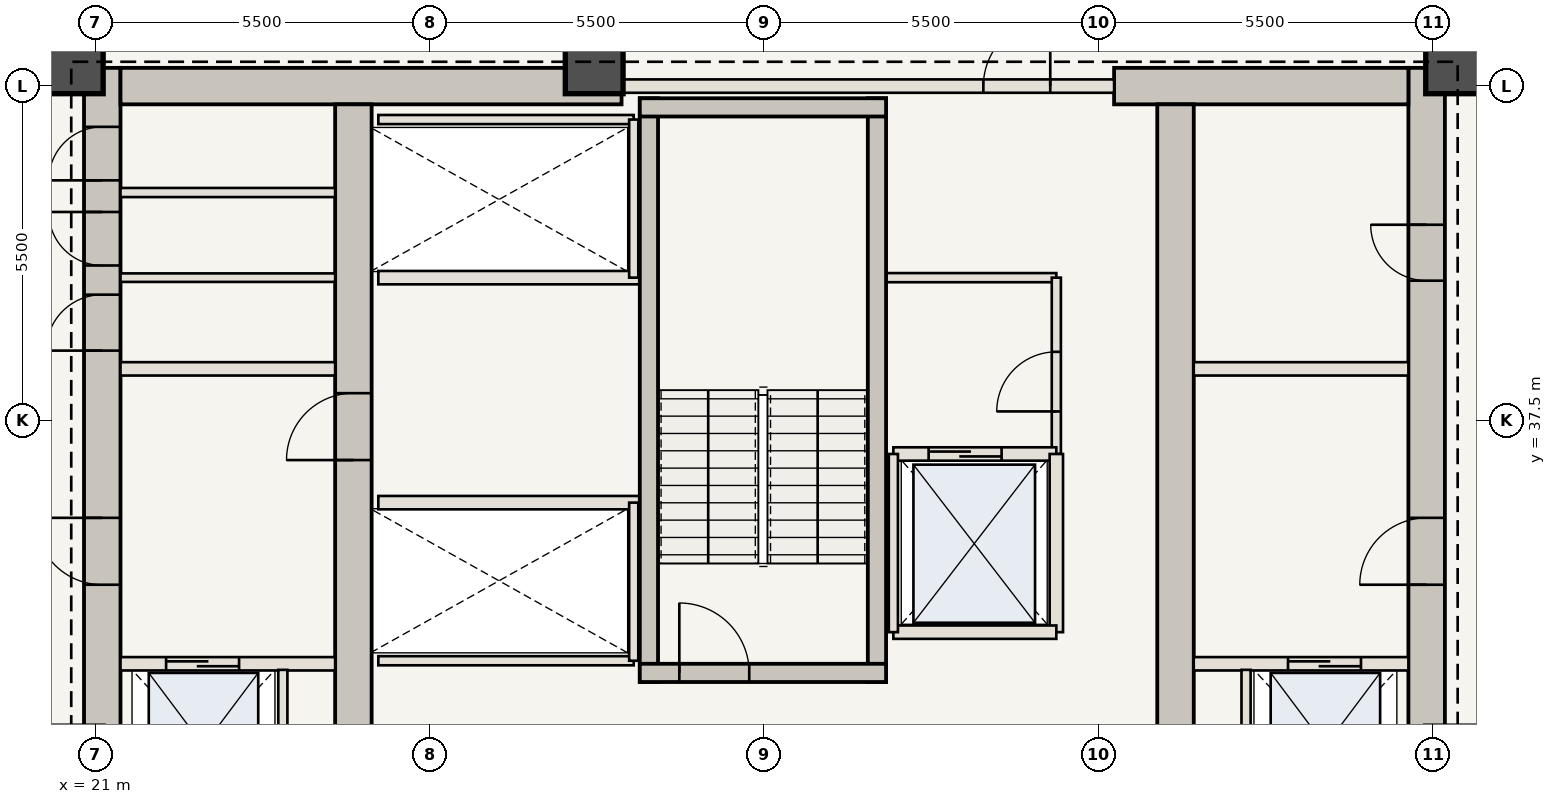
"""IFC4 building model, lengths in metres.
Left out: names, types, materials, properties, quantities, classifications, styles, units other than length and angle.
Written with IfcOpenShell. Run it as: python <this file> out.ifc"""

import sys

from ifc_helpers import new_model, si_unit, direction, frame, frame_2d, origin, origin_2d, place, context, subcontext, project, spatial, rectangle, extrude, element, fill, save


model = new_model("IFC4")
c1 = context("Model", 3, precision=1e-05, world=origin(), true_north=direction((0.0, 1.0)))
c2 = subcontext(c1, "Body", "Model", "MODEL_VIEW")
j1 = project(units=[si_unit("LENGTHUNIT", "METRE"), si_unit("PLANEANGLEUNIT", "RADIAN")], contexts=[c1])
p1 = place(None, origin())
s1 = spatial("IfcSite", under=j1, at=p1, CompositionType="ELEMENT")
p2 = place(p1, origin())
s2 = spatial("IfcBuilding", under=s1, at=p2, CompositionType="ELEMENT")
p3 = place(p2, frame((0.0, 0.0, 168.35)))
s3 = spatial("IfcBuildingStorey", under=s2, at=p3, CompositionType="ELEMENT", Elevation=168.35)
p4 = place(p3, frame((21.11, 30.6, 0.0), z_axis=(0.0, 0.0, 1.0), x_axis=(0.0, 1.0, 0.0)))
e1 = element("IfcWall", 1, at=p4, inside=s3, PredefinedType="SHEAR", context=c2, shape_type="SweptSolid", body=[
    extrude(rectangle(XDim=12.7, YDim=0.6, at=frame_2d((6.35, 0.0))), origin(), (0.0, 0.0, 1.0), 3.85),
])
p5 = place(p4, frame((4.2, 0.0, 0.0)))
e2 = element("IfcOpeningElement", 2, at=p5, cuts=e1, PredefinedType="OPENING", context=c2, shape_type="SweptSolid", body=[
    extrude(rectangle(XDim=1.1, YDim=2.15, at=frame_2d((0.55, 1.075))), frame((0.0, 0.31, 0.0), z_axis=(0.0, -1.0, 0.0), x_axis=(1.0, 0.0, 0.0)), (0.0, 0.0, 1.0), 0.62),
])
p6 = place(p4, frame((8.05, 0.0, 0.0)))
e3 = element("IfcOpeningElement", 3, at=p6, cuts=e1, PredefinedType="OPENING", context=c2, shape_type="SweptSolid", body=[
    extrude(rectangle(XDim=0.92, YDim=2.1, at=frame_2d((0.46, 1.05))), frame((0.0, 0.31, 0.0), z_axis=(0.0, -1.0, 0.0), x_axis=(1.0, 0.0, 0.0)), (0.0, 0.0, 1.0), 0.62),
])
p7 = place(p4, frame((9.45, 0.0, 0.0)))
e4 = element("IfcOpeningElement", 4, at=p7, cuts=e1, PredefinedType="OPENING", context=c2, shape_type="SweptSolid", body=[
    extrude(rectangle(XDim=0.88, YDim=2.1, at=frame_2d((0.44, 1.05))), frame((0.0, 0.31, 0.0), z_axis=(0.0, -1.0, 0.0), x_axis=(1.0, 0.0, 0.0)), (0.0, 0.0, 1.0), 0.62),
])
p8 = place(p4, frame((10.85, 0.0, 0.0)))
e5 = element("IfcOpeningElement", 5, at=p8, cuts=e1, PredefinedType="OPENING", context=c2, shape_type="SweptSolid", body=[
    extrude(rectangle(XDim=0.88, YDim=2.1, at=frame_2d((0.44, 1.05))), frame((0.0, 0.31, 0.0), z_axis=(0.0, -1.0, 0.0), x_axis=(1.0, 0.0, 0.0)), (0.0, 0.0, 1.0), 0.62),
])
p9 = place(p3, frame((42.89, 30.6, 0.0), z_axis=(0.0, 0.0, 1.0), x_axis=(0.0, 1.0, 0.0)))
e6 = element("IfcWall", 6, at=p9, inside=s3, PredefinedType="SHEAR", context=c2, shape_type="SweptSolid", body=[
    extrude(rectangle(XDim=12.7, YDim=0.6, at=frame_2d((6.35, 0.0))), origin(), (0.0, 0.0, 1.0), 3.85),
])
p10 = place(p9, frame((4.2, 0.0, 0.0)))
e7 = element("IfcOpeningElement", 7, at=p10, cuts=e6, PredefinedType="OPENING", context=c2, shape_type="SweptSolid", body=[
    extrude(rectangle(XDim=1.1, YDim=2.15, at=frame_2d((0.55, 1.075))), frame((0.0, 0.31, 0.0), z_axis=(0.0, -1.0, 0.0), x_axis=(1.0, 0.0, 0.0)), (0.0, 0.0, 1.0), 0.62),
])
p11 = place(p9, frame((9.2, 0.0, 0.0)))
e8 = element("IfcOpeningElement", 8, at=p11, cuts=e6, PredefinedType="OPENING", context=c2, shape_type="SweptSolid", body=[
    extrude(rectangle(XDim=0.92, YDim=2.1, at=frame_2d((0.46, 1.05))), frame((0.0, 0.31, 0.0), z_axis=(0.0, -1.0, 0.0), x_axis=(1.0, 0.0, 0.0)), (0.0, 0.0, 1.0), 0.62),
])
p12 = place(p3, frame((21.41, 43.0, 0.0), z_axis=(0.0, 0.0, 1.0), x_axis=(1.0, 0.0, 0.0)))
e9 = element("IfcWall", 9, at=p12, inside=s3, PredefinedType="SHEAR", context=c2, shape_type="SweptSolid", body=[
    extrude(rectangle(XDim=8.24, YDim=0.6, at=frame_2d((4.12, 0.0))), origin(), (0.0, 0.0, 1.0), 3.85),
])
p13 = place(p3, frame((37.75, 43.0, 0.0), z_axis=(0.0, 0.0, 1.0), x_axis=(1.0, 0.0, 0.0)))
e10 = element("IfcWall", 10, at=p13, inside=s3, PredefinedType="SHEAR", context=c2, shape_type="SweptSolid", body=[
    extrude(rectangle(XDim=4.84, YDim=0.6, at=frame_2d((2.42, 0.0))), origin(), (0.0, 0.0, 1.0), 3.85),
])
p14 = place(p3, frame((25.24, 30.6, 0.0), z_axis=(0.0, 0.0, 1.0), x_axis=(0.0, 1.0, 0.0)))
e11 = element("IfcWall", 11, at=p14, inside=s3, PredefinedType="SHEAR", context=c2, shape_type="SweptSolid", body=[
    extrude(rectangle(XDim=12.1, YDim=0.6, at=frame_2d((6.05, 0.0))), origin(), (0.0, 0.0, 1.0), 3.85),
])
p15 = place(p14, frame((6.25, 0.0, 0.0)))
e12 = element("IfcOpeningElement", 12, at=p15, cuts=e11, PredefinedType="OPENING", context=c2, shape_type="SweptSolid", body=[
    extrude(rectangle(XDim=1.1, YDim=2.15, at=frame_2d((0.55, 1.075))), frame((0.0, 0.31, 0.0), z_axis=(0.0, -1.0, 0.0), x_axis=(1.0, 0.0, 0.0)), (0.0, 0.0, 1.0), 0.62),
])
p16 = place(p3, frame((38.76, 30.6, 0.0), z_axis=(0.0, 0.0, 1.0), x_axis=(0.0, 1.0, 0.0)))
e13 = element("IfcWall", 13, at=p16, inside=s3, PredefinedType="SHEAR", context=c2, shape_type="SweptSolid", body=[
    extrude(rectangle(XDim=12.1, YDim=0.6, at=frame_2d((6.05, 0.0))), origin(), (0.0, 0.0, 1.0), 3.85),
])
for number, where, z_axis, x_axis in (
    (14, (43.35, 43.35, 0.0), (0.0, 0.0, 1.0), (1.0, 0.0, 0.0)),
    (15, (29.2, 43.35, 0.0), (0.0, 0.0, 1.0), (1.0, 0.0, 0.0)),
    (16, (20.65, 43.35, 0.0), (0.0, 0.0, 1.0), (1.0, 0.0, 0.0)),
):
    element("IfcColumn", number, at=place(p3, frame(where, z_axis=z_axis, x_axis=x_axis)), inside=s3, PredefinedType="COLUMN", context=c2, shape_type="SweptSolid", body=[
        extrude(rectangle(XDim=0.95, YDim=0.95, at=origin_2d()), origin(), (0.0, 0.0, 1.0), 3.85),
    ])
p17 = place(p3, frame((21.41, 33.5, 0.0), z_axis=(0.0, 0.0, 1.0), x_axis=(1.0, 0.0, 0.0)))
e17 = element("IfcWall", 17, at=p17, inside=s3, PredefinedType="STANDARD", context=c2, shape_type="SweptSolid", body=[
    extrude(rectangle(XDim=3.53, YDim=0.22, at=frame_2d((1.765, 0.0))), origin(), (0.0, 0.0, 1.0), 3.685),
])
p18 = place(p17, frame((0.75, 0.0, 0.0)))
e18 = element("IfcOpeningElement", 18, at=p18, cuts=e17, PredefinedType="OPENING", context=c2, shape_type="SweptSolid", body=[
    extrude(rectangle(XDim=1.2, YDim=2.2, at=frame_2d((0.6, 1.1))), frame((0.0, 0.12, 0.0), z_axis=(0.0, -1.0, 0.0), x_axis=(1.0, 0.0, 0.0)), (0.0, 0.0, 1.0), 0.24),
])
p19 = place(p3, frame((24.08, 30.75, 0.0), z_axis=(0.0, 0.0, 1.0), x_axis=(0.0, 1.0, 0.0)))
e19 = element("IfcWall", 19, at=p19, inside=s3, PredefinedType="STANDARD", context=c2, shape_type="SweptSolid", body=[
    extrude(rectangle(XDim=2.65, YDim=0.15, at=frame_2d((1.325, 0.0))), origin(), (0.0, 0.0, 1.0), 3.685),
])
p20 = place(p3, frame((39.06, 33.5, 0.0), z_axis=(0.0, 0.0, 1.0), x_axis=(1.0, 0.0, 0.0)))
e20 = element("IfcWall", 20, at=p20, inside=s3, PredefinedType="STANDARD", context=c2, shape_type="SweptSolid", body=[
    extrude(rectangle(XDim=3.53, YDim=0.22, at=frame_2d((1.765, 0.0))), origin(), (0.0, 0.0, 1.0), 3.685),
])
p21 = place(p20, frame((1.55, 0.0, 0.0)))
e21 = element("IfcOpeningElement", 21, at=p21, cuts=e20, PredefinedType="OPENING", context=c2, shape_type="SweptSolid", body=[
    extrude(rectangle(XDim=1.2, YDim=2.2, at=frame_2d((0.6, 1.1))), frame((0.0, 0.12, 0.0), z_axis=(0.0, -1.0, 0.0), x_axis=(1.0, 0.0, 0.0)), (0.0, 0.0, 1.0), 0.24),
])
p22 = place(p3, frame((39.92, 30.75, 0.0), z_axis=(0.0, 0.0, 1.0), x_axis=(0.0, 1.0, 0.0)))
e22 = element("IfcWall", 22, at=p22, inside=s3, PredefinedType="STANDARD", context=c2, shape_type="SweptSolid", body=[
    extrude(rectangle(XDim=2.65, YDim=0.15, at=frame_2d((1.325, 0.0))), origin(), (0.0, 0.0, 1.0), 3.685),
])
for number, where, z_axis, x_axis in (
    (23, (21.41, 38.35, 0.0), (0.0, 0.0, 1.0), (1.0, 0.0, 0.0)),
    (24, (39.06, 38.35, 0.0), (0.0, 0.0, 1.0), (1.0, 0.0, 0.0)),
):
    element("IfcWall", number, at=place(p3, frame(where, z_axis=z_axis, x_axis=x_axis)), inside=s3, PredefinedType="STANDARD", context=c2, shape_type="SweptSolid", body=[
        extrude(rectangle(XDim=3.53, YDim=0.22, at=frame_2d((1.765, 0.0))), origin(), (0.0, 0.0, 1.0), 3.685),
    ])
p23 = place(p3, frame((21.41, 39.85, 0.0), z_axis=(0.0, 0.0, 1.0), x_axis=(1.0, 0.0, 0.0)))
e25 = element("IfcWall", 25, at=p23, inside=s3, PredefinedType="STANDARD", context=c2, shape_type="SweptSolid", body=[
    extrude(rectangle(XDim=3.53, YDim=0.14, at=frame_2d((1.765, 0.0))), origin(), (0.0, 0.0, 1.0), 3.685),
])
p24 = place(p3, frame((21.41, 41.25, 0.0), z_axis=(0.0, 0.0, 1.0), x_axis=(1.0, 0.0, 0.0)))
e26 = element("IfcWall", 26, at=p24, inside=s3, PredefinedType="STANDARD", context=c2, shape_type="SweptSolid", body=[
    extrude(rectangle(XDim=3.53, YDim=0.15, at=frame_2d((1.765, 0.0))), origin(), (0.0, 0.0, 1.0), 3.685),
])
p25 = place(p3, frame((34.0, 39.85, 0.0), z_axis=(0.0, 0.0, 1.0), x_axis=(1.0, 0.0, 0.0)))
e27 = element("IfcWall", 27, at=p25, inside=s3, PredefinedType="STANDARD", context=c2, shape_type="SweptSolid", body=[
    extrude(rectangle(XDim=2.8, YDim=0.15, at=frame_2d((1.4, 0.0))), origin(), (0.0, 0.0, 1.0), 3.685),
])
p26 = place(p3, frame((36.8, 36.95, 0.0), z_axis=(0.0, 0.0, 1.0), x_axis=(0.0, 1.0, 0.0)))
e28 = element("IfcWall", 28, at=p26, inside=s3, PredefinedType="STANDARD", context=c2, shape_type="SweptSolid", body=[
    extrude(rectangle(XDim=2.9, YDim=0.15, at=frame_2d((1.45, 0.0))), origin(), (0.0, 0.0, 1.0), 3.685),
])
p27 = place(p26, frame((0.7, 0.0, 0.0)))
e29 = element("IfcOpeningElement", 29, at=p27, cuts=e28, PredefinedType="OPENING", context=c2, shape_type="SweptSolid", body=[
    extrude(rectangle(XDim=0.98, YDim=2.2, at=frame_2d((0.49, 1.1))), frame((0.0, 0.085, 0.0), z_axis=(0.0, -1.0, 0.0), x_axis=(1.0, 0.0, 0.0)), (0.0, 0.0, 1.0), 0.17),
])
p28 = place(p3, frame((25.65, 36.15, 0.0), z_axis=(0.0, 0.0, 1.0), x_axis=(1.0, 0.0, 0.0)))
e30 = element("IfcWall", 30, at=p28, inside=s3, PredefinedType="STANDARD", context=c2, shape_type="SweptSolid", body=[
    extrude(rectangle(XDim=4.3, YDim=0.22, at=frame_2d((2.15, 0.0))), origin(), (0.0, 0.0, 1.0), 3.685),
])
p29 = place(p3, frame((25.65, 33.55, 0.0), z_axis=(0.0, 0.0, 1.0), x_axis=(1.0, 0.0, 0.0)))
e31 = element("IfcWall", 31, at=p29, inside=s3, PredefinedType="STANDARD", context=c2, shape_type="SweptSolid", body=[
    extrude(rectangle(XDim=4.2, YDim=0.15, at=frame_2d((2.1, 0.0))), origin(), (0.0, 0.0, 1.0), 3.685),
])
p30 = place(p3, frame((29.85, 33.55, 0.0), z_axis=(0.0, 0.0, 1.0), x_axis=(0.0, 1.0, 0.0)))
e32 = element("IfcWall", 32, at=p30, inside=s3, PredefinedType="STANDARD", context=c2, shape_type="SweptSolid", body=[
    extrude(rectangle(XDim=2.6, YDim=0.15, at=frame_2d((1.3, 0.0))), origin(), (0.0, 0.0, 1.0), 3.685),
])
p31 = place(p3, frame((25.65, 39.85, 0.0), z_axis=(0.0, 0.0, 1.0), x_axis=(1.0, 0.0, 0.0)))
e33 = element("IfcWall", 33, at=p31, inside=s3, PredefinedType="STANDARD", context=c2, shape_type="SweptSolid", body=[
    extrude(rectangle(XDim=4.3, YDim=0.22, at=frame_2d((2.15, 0.0))), origin(), (0.0, 0.0, 1.0), 3.685),
])
p32 = place(p3, frame((25.65, 42.45, 0.0), z_axis=(0.0, 0.0, 1.0), x_axis=(1.0, 0.0, 0.0)))
e34 = element("IfcWall", 34, at=p32, inside=s3, PredefinedType="STANDARD", context=c2, shape_type="SweptSolid", body=[
    extrude(rectangle(XDim=4.2, YDim=0.15, at=frame_2d((2.1, 0.0))), origin(), (0.0, 0.0, 1.0), 3.685),
])
p33 = place(p3, frame((29.85, 39.85, 0.0), z_axis=(0.0, 0.0, 1.0), x_axis=(0.0, 1.0, 0.0)))
e35 = element("IfcWall", 35, at=p33, inside=s3, PredefinedType="STANDARD", context=c2, shape_type="SweptSolid", body=[
    extrude(rectangle(XDim=2.6, YDim=0.15, at=frame_2d((1.3, 0.0))), origin(), (0.0, 0.0, 1.0), 3.685),
])
for number, where, z_axis, x_axis in (
    (36, (30.1, 33.2, 0.0), (0.0, 0.0, 1.0), (0.0, 1.0, 0.0)),
    (37, (33.85, 33.2, 0.0), (0.0, 0.0, 1.0), (0.0, 1.0, 0.0)),
):
    element("IfcWall", number, at=place(p3, frame(where, z_axis=z_axis, x_axis=x_axis)), inside=s3, PredefinedType="SHEAR", context=c2, shape_type="SweptSolid", body=[
        extrude(rectangle(XDim=9.6, YDim=0.3, at=frame_2d((4.8, 0.0))), origin(), (0.0, 0.0, 1.0), 3.685),
    ])
p34 = place(p3, frame((29.95, 33.35, 0.0), z_axis=(0.0, 0.0, 1.0), x_axis=(1.0, 0.0, 0.0)))
e38 = element("IfcWall", 38, at=p34, inside=s3, PredefinedType="SHEAR", context=c2, shape_type="SweptSolid", body=[
    extrude(rectangle(XDim=4.05, YDim=0.3, at=frame_2d((2.025, 0.0))), origin(), (0.0, 0.0, 1.0), 3.685),
])
p35 = place(p34, frame((0.65, 0.0, 0.0)))
e39 = element("IfcOpeningElement", 39, at=p35, cuts=e38, PredefinedType="OPENING", context=c2, shape_type="SweptSolid", body=[
    extrude(rectangle(XDim=1.15, YDim=2.15, at=frame_2d((0.575, 1.075))), frame((0.0, 0.16, 0.0), z_axis=(0.0, -1.0, 0.0), x_axis=(1.0, 0.0, 0.0)), (0.0, 0.0, 1.0), 0.32),
])
p36 = place(p3, frame((29.95, 42.65, 0.0), z_axis=(0.0, 0.0, 1.0), x_axis=(1.0, 0.0, 0.0)))
e40 = element("IfcWall", 40, at=p36, inside=s3, PredefinedType="SHEAR", context=c2, shape_type="SweptSolid", body=[
    extrude(rectangle(XDim=4.05, YDim=0.3, at=frame_2d((2.025, 0.0))), origin(), (0.0, 0.0, 1.0), 3.685),
])
p37 = place(p3, frame((29.65, 43.0, 0.0), z_axis=(0.0, 0.0, 1.0), x_axis=(1.0, 0.0, 0.0)))
e41 = element("IfcWall", 41, at=p37, inside=s3, PredefinedType="STANDARD", context=c2, shape_type="SweptSolid", body=[
    extrude(rectangle(XDim=8.1, YDim=0.22, at=frame_2d((4.05, 0.0))), origin(), (0.0, 0.0, 1.0), 3.685),
])
p38 = place(p37, frame((5.95, 0.0, 0.0)))
e42 = element("IfcOpeningElement", 42, at=p38, cuts=e41, PredefinedType="OPENING", context=c2, shape_type="SweptSolid", body=[
    extrude(rectangle(XDim=1.1, YDim=2.15, at=frame_2d((0.55, 1.075))), frame((0.0, 0.12, 0.0), z_axis=(0.0, -1.0, 0.0), x_axis=(1.0, 0.0, 0.0)), (0.0, 0.0, 1.0), 0.24),
])
p39 = place(p3, frame((34.12, 36.95, 0.0), z_axis=(0.0, 0.0, 1.0), x_axis=(1.0, 0.0, 0.0)))
e43 = element("IfcWall", 43, at=p39, inside=s3, PredefinedType="STANDARD", context=c2, shape_type="SweptSolid", body=[
    extrude(rectangle(XDim=2.68, YDim=0.22, at=frame_2d((1.34, 0.0))), origin(), (0.0, 0.0, 1.0), 3.685),
])
p40 = place(p39, frame((0.58, 0.0, 0.0)))
e44 = element("IfcOpeningElement", 44, at=p40, cuts=e43, PredefinedType="OPENING", context=c2, shape_type="SweptSolid", body=[
    extrude(rectangle(XDim=1.2, YDim=2.2, at=frame_2d((0.6, 1.1))), frame((0.0, 0.12, 0.0), z_axis=(0.0, -1.0, 0.0), x_axis=(1.0, 0.0, 0.0)), (0.0, 0.0, 1.0), 0.24),
])
p41 = place(p3, frame((36.8, 34.02, 0.0), z_axis=(0.0, 0.0, 1.0), x_axis=(0.0, 1.0, 0.0)))
e45 = element("IfcWall", 45, at=p41, inside=s3, PredefinedType="STANDARD", context=c2, shape_type="SweptSolid", body=[
    extrude(rectangle(XDim=2.93, YDim=0.22, at=frame_2d((1.465, 0.0))), origin(), (0.0, 0.0, 1.0), 3.685),
])
p42 = place(p3, frame((34.12, 34.02, 0.0), z_axis=(0.0, 0.0, 1.0), x_axis=(1.0, 0.0, 0.0)))
e46 = element("IfcWall", 46, at=p42, inside=s3, PredefinedType="STANDARD", context=c2, shape_type="SweptSolid", body=[
    extrude(rectangle(XDim=2.68, YDim=0.22, at=frame_2d((1.34, 0.0))), origin(), (0.0, 0.0, 1.0), 3.685),
])
p43 = place(p3, frame((34.12, 34.02, 0.0), z_axis=(0.0, 0.0, 1.0), x_axis=(0.0, 1.0, 0.0)))
e47 = element("IfcWall", 47, at=p43, inside=s3, PredefinedType="STANDARD", context=c2, shape_type="SweptSolid", body=[
    extrude(rectangle(XDim=2.93, YDim=0.15, at=frame_2d((1.465, 0.0))), origin(), (0.0, 0.0, 1.0), 3.685),
])
p44 = place(p5, origin())
e48 = element("IfcDoor", 48, at=p44, inside=s3, OperationType="SINGLE_SWING_RIGHT", PredefinedType="DOOR", context=c2, shape_type="SweptSolid", body=[
    extrude(rectangle(XDim=1.1, YDim=2.15, at=frame_2d((0.55, 1.075))), frame((0.0, 0.025, 0.0), z_axis=(0.0, -1.0, 0.0), x_axis=(1.0, 0.0, 0.0)), (0.0, 0.0, 1.0), 0.05),
])
fill(e2, e48)
p45 = place(p10, origin())
e49 = element("IfcDoor", 49, at=p45, inside=s3, OperationType="SINGLE_SWING_LEFT", PredefinedType="DOOR", context=c2, shape_type="SweptSolid", body=[
    extrude(rectangle(XDim=1.1, YDim=2.15, at=frame_2d((0.55, 1.075))), frame((0.0, 0.025, 0.0), z_axis=(0.0, -1.0, 0.0), x_axis=(1.0, 0.0, 0.0)), (0.0, 0.0, 1.0), 0.05),
])
fill(e7, e49)
p46 = place(p15, origin())
e50 = element("IfcDoor", 50, at=p46, inside=s3, OperationType="SINGLE_SWING_LEFT", PredefinedType="DOOR", context=c2, shape_type="SweptSolid", body=[
    extrude(rectangle(XDim=1.1, YDim=2.15, at=frame_2d((0.55, 1.075))), frame((0.0, 0.025, 0.0), z_axis=(0.0, -1.0, 0.0), x_axis=(1.0, 0.0, 0.0)), (0.0, 0.0, 1.0), 0.05),
])
fill(e12, e50)
p47 = place(p6, origin())
e51 = element("IfcDoor", 51, at=p47, inside=s3, OperationType="SINGLE_SWING_LEFT", PredefinedType="DOOR", context=c2, shape_type="SweptSolid", body=[
    extrude(rectangle(XDim=0.92, YDim=2.1, at=frame_2d((0.46, 1.05))), frame((0.0, 0.025, 0.0), z_axis=(0.0, -1.0, 0.0), x_axis=(1.0, 0.0, 0.0)), (0.0, 0.0, 1.0), 0.05),
])
fill(e3, e51)
p48 = place(p7, origin())
e52 = element("IfcDoor", 52, at=p48, inside=s3, OperationType="SINGLE_SWING_RIGHT", PredefinedType="DOOR", context=c2, shape_type="SweptSolid", body=[
    extrude(rectangle(XDim=0.88, YDim=2.1, at=frame_2d((0.44, 1.05))), frame((0.0, 0.025, 0.0), z_axis=(0.0, -1.0, 0.0), x_axis=(1.0, 0.0, 0.0)), (0.0, 0.0, 1.0), 0.05),
])
fill(e4, e52)
p49 = place(p8, origin())
e53 = element("IfcDoor", 53, at=p49, inside=s3, OperationType="SINGLE_SWING_LEFT", PredefinedType="DOOR", context=c2, shape_type="SweptSolid", body=[
    extrude(rectangle(XDim=0.88, YDim=2.1, at=frame_2d((0.44, 1.05))), frame((0.0, 0.025, 0.0), z_axis=(0.0, -1.0, 0.0), x_axis=(1.0, 0.0, 0.0)), (0.0, 0.0, 1.0), 0.05),
])
fill(e5, e53)
p50 = place(p11, origin())
e54 = element("IfcDoor", 54, at=p50, inside=s3, OperationType="SINGLE_SWING_RIGHT", PredefinedType="DOOR", context=c2, shape_type="SweptSolid", body=[
    extrude(rectangle(XDim=0.92, YDim=2.1, at=frame_2d((0.46, 1.05))), frame((0.0, 0.025, 0.0), z_axis=(0.0, -1.0, 0.0), x_axis=(1.0, 0.0, 0.0)), (0.0, 0.0, 1.0), 0.05),
])
fill(e8, e54)
p51 = place(p18, origin())
e55 = element("IfcDoor", 55, at=p51, inside=s3, OperationType="DOUBLE_DOOR_SLIDING", PredefinedType="DOOR", context=c2, shape_type="SweptSolid", body=[
    extrude(rectangle(XDim=1.2, YDim=2.2, at=frame_2d((0.6, 1.1))), frame((0.0, 0.025, 0.0), z_axis=(0.0, -1.0, 0.0), x_axis=(1.0, 0.0, 0.0)), (0.0, 0.0, 1.0), 0.05),
])
fill(e18, e55)
p52 = place(p21, origin())
e56 = element("IfcDoor", 56, at=p52, inside=s3, OperationType="DOUBLE_DOOR_SLIDING", PredefinedType="DOOR", context=c2, shape_type="SweptSolid", body=[
    extrude(rectangle(XDim=1.2, YDim=2.2, at=frame_2d((0.6, 1.1))), frame((0.0, 0.025, 0.0), z_axis=(0.0, -1.0, 0.0), x_axis=(1.0, 0.0, 0.0)), (0.0, 0.0, 1.0), 0.05),
])
fill(e21, e56)
p53 = place(p27, origin())
e57 = element("IfcDoor", 57, at=p53, inside=s3, OperationType="SINGLE_SWING_LEFT", PredefinedType="DOOR", context=c2, shape_type="SweptSolid", body=[
    extrude(rectangle(XDim=0.98, YDim=2.2, at=frame_2d((0.49, 1.1))), frame((0.0, 0.025, 0.0), z_axis=(0.0, -1.0, 0.0), x_axis=(1.0, 0.0, 0.0)), (0.0, 0.0, 1.0), 0.05),
])
fill(e29, e57)
p54 = place(p35, origin())
e58 = element("IfcDoor", 58, at=p54, inside=s3, OperationType="SINGLE_SWING_LEFT", PredefinedType="DOOR", context=c2, shape_type="SweptSolid", body=[
    extrude(rectangle(XDim=1.15, YDim=2.15, at=frame_2d((0.575, 1.075))), frame((0.0, 0.025, 0.0), z_axis=(0.0, -1.0, 0.0), x_axis=(1.0, 0.0, 0.0)), (0.0, 0.0, 1.0), 0.05),
])
fill(e39, e58)
p55 = place(p38, origin())
e59 = element("IfcDoor", 59, at=p55, inside=s3, OperationType="SINGLE_SWING_RIGHT", PredefinedType="DOOR", context=c2, shape_type="SweptSolid", body=[
    extrude(rectangle(XDim=1.1, YDim=2.15, at=frame_2d((0.55, 1.075))), frame((0.0, 0.025, 0.0), z_axis=(0.0, -1.0, 0.0), x_axis=(1.0, 0.0, 0.0)), (0.0, 0.0, 1.0), 0.05),
])
fill(e42, e59)
p56 = place(p40, origin())
e60 = element("IfcDoor", 60, at=p56, inside=s3, OperationType="DOUBLE_DOOR_SLIDING", PredefinedType="DOOR", context=c2, shape_type="SweptSolid", body=[
    extrude(rectangle(XDim=1.2, YDim=2.2, at=frame_2d((0.6, 1.1))), frame((0.0, 0.025, 0.0), z_axis=(0.0, -1.0, 0.0), x_axis=(1.0, 0.0, 0.0)), (0.0, 0.0, 1.0), 0.05),
])
fill(e44, e60)
save(model, sys.argv[1])
